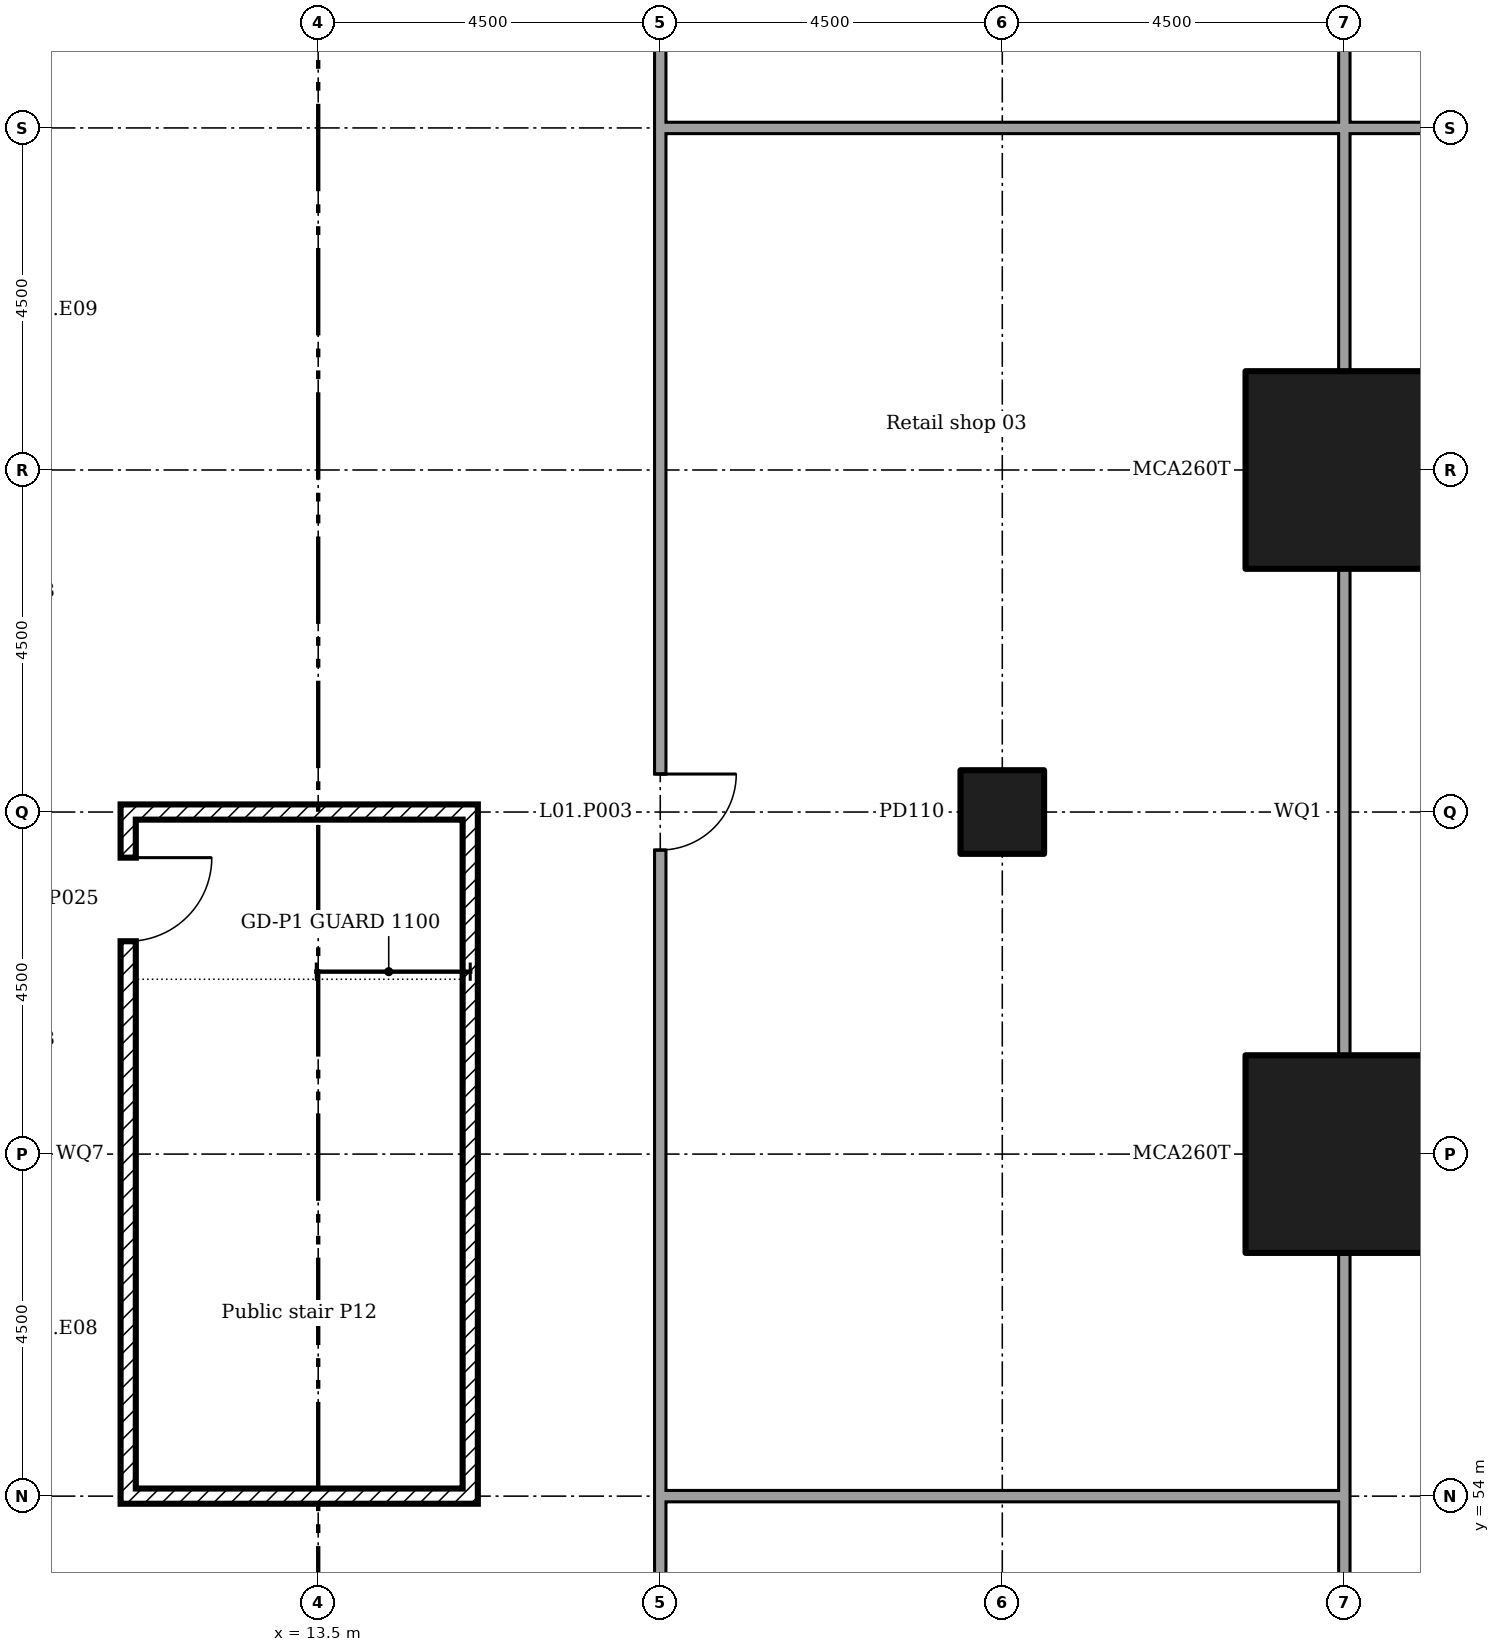
"""IFC4 building model, lengths in metres.
Left out: names, types, materials, properties, quantities, classifications, styles, units other than length and angle.
Written with IfcOpenShell. Run it as: python <this file> out.ifc"""

import sys

from ifc_helpers import new_model, si_unit, direction, frame, frame_2d, origin, origin_2d, place, context, subcontext, project, spatial, rectangle, extrude, element, fill, save


model = new_model("IFC4")
c1 = context("Model", 3, precision=1e-05, world=origin(), true_north=direction((0.0, 1.0)))
c2 = subcontext(c1, "Body", "Model", "MODEL_VIEW")
j1 = project(units=[si_unit("LENGTHUNIT", "METRE"), si_unit("PLANEANGLEUNIT", "RADIAN")], contexts=[c1])
p1 = place(None, origin())
s1 = spatial("IfcSite", under=j1, at=p1, CompositionType="ELEMENT")
p2 = place(p1, origin())
s2 = spatial("IfcBuilding", under=s1, at=p2, CompositionType="ELEMENT")
p3 = place(p2, frame((0.0, 0.0, 6.0)))
s3 = spatial("IfcBuildingStorey", under=s2, at=p3, CompositionType="ELEMENT", Elevation=6.0)
for number, where in (
    (1, (27.0, 58.5, 0.0)),
    (2, (27.0, 67.5, 0.0)),
):
    element("IfcColumn", number, at=place(p3, frame(where)), inside=s3, PredefinedType="COLUMN", context=c2, shape_type="SweptSolid", body=[
        extrude(rectangle(XDim=2.6, YDim=2.6, at=origin_2d()), origin(), (0.0, 0.0, 1.0), 5.5),
    ])
p4 = place(p3, frame((22.5, 63.0, 0.0)))
e3 = element("IfcColumn", 3, at=p4, inside=s3, PredefinedType="COLUMN", context=c2, shape_type="SweptSolid", body=[
    extrude(rectangle(XDim=1.1, YDim=1.1, at=origin_2d()), origin(), (0.0, 0.0, 1.0), 5.5),
])
p5 = place(p3, frame((18.0, 36.0, 0.0), z_axis=(0.0, 0.0, 1.0), x_axis=(0.0, 1.0, 0.0)))
e4 = element("IfcWall", 4, at=p5, inside=s3, PredefinedType="PARTITIONING", context=c2, shape_type="SweptSolid", body=[
    extrude(rectangle(XDim=18.075, YDim=0.15, at=frame_2d((9.038, 0.0))), origin(), (0.0, 0.0, 1.0), 5.05),
])
p6 = place(p5, frame((8.5, 0.0, 0.0)))
e5 = element("IfcOpeningElement", 5, at=p6, cuts=e4, PredefinedType="OPENING", context=c2, shape_type="SweptSolid", body=[
    extrude(rectangle(XDim=1.0, YDim=2.1, at=frame_2d((0.5, 1.05))), frame((0.0, 0.085, 0.0), z_axis=(0.0, -1.0, 0.0), x_axis=(1.0, 0.0, 0.0)), (0.0, 0.0, 1.0), 0.17),
])
p7 = place(p3, frame((18.0, 54.0, 0.0), z_axis=(0.0, 0.0, 1.0), x_axis=(0.0, 1.0, 0.0)))
e6 = element("IfcWall", 6, at=p7, inside=s3, PredefinedType="PARTITIONING", context=c2, shape_type="SweptSolid", body=[
    extrude(rectangle(XDim=18.075, YDim=0.15, at=frame_2d((9.038, 0.0))), origin(), (0.0, 0.0, 1.0), 5.05),
])
p8 = place(p7, frame((8.5, 0.0, 0.0)))
e7 = element("IfcOpeningElement", 7, at=p8, cuts=e6, PredefinedType="OPENING", context=c2, shape_type="SweptSolid", body=[
    extrude(rectangle(XDim=1.0, YDim=2.1, at=frame_2d((0.5, 1.05))), frame((0.0, 0.085, 0.0), z_axis=(0.0, -1.0, 0.0), x_axis=(1.0, 0.0, 0.0)), (0.0, 0.0, 1.0), 0.17),
])
p9 = place(p3, frame((18.0, 72.0, 0.0), z_axis=(0.0, 0.0, 1.0), x_axis=(0.0, 1.0, 0.0)))
e8 = element("IfcWall", 8, at=p9, inside=s3, PredefinedType="PARTITIONING", context=c2, shape_type="SweptSolid", body=[
    extrude(rectangle(XDim=9.0, YDim=0.15, at=frame_2d((4.5, 0.0))), origin(), (0.0, 0.0, 1.0), 5.05),
])
p10 = place(p9, frame((4.0, 0.0, 0.0)))
e9 = element("IfcOpeningElement", 9, at=p10, cuts=e8, PredefinedType="OPENING", context=c2, shape_type="SweptSolid", body=[
    extrude(rectangle(XDim=1.0, YDim=2.1, at=frame_2d((0.5, 1.05))), frame((0.0, 0.085, 0.0), z_axis=(0.0, -1.0, 0.0), x_axis=(1.0, 0.0, 0.0)), (0.0, 0.0, 1.0), 0.17),
])
p11 = place(p3, frame((11.0, 53.9, 0.0), z_axis=(0.0, 0.0, 1.0), x_axis=(0.0, 1.0, 0.0)))
e10 = element("IfcWall", 10, at=p11, inside=s3, PredefinedType="SOLIDWALL", context=c2, shape_type="SweptSolid", body=[
    extrude(rectangle(XDim=9.2, YDim=0.2, at=frame_2d((4.6, 0.0))), origin(), (0.0, 0.0, 1.0), 5.05),
])
p12 = place(p11, frame((7.4, 0.0, 0.0)))
e11 = element("IfcOpeningElement", 11, at=p12, cuts=e10, PredefinedType="OPENING", context=c2, shape_type="SweptSolid", body=[
    extrude(rectangle(XDim=1.1, YDim=2.1, at=frame_2d((0.55, 1.05))), frame((0.0, 0.11, 0.0), z_axis=(0.0, -1.0, 0.0), x_axis=(1.0, 0.0, 0.0)), (0.0, 0.0, 1.0), 0.22),
])
p13 = place(p3, frame((15.5, 53.9, 0.0), z_axis=(0.0, 0.0, 1.0), x_axis=(0.0, 1.0, 0.0)))
e12 = element("IfcWall", 12, at=p13, inside=s3, PredefinedType="SOLIDWALL", context=c2, shape_type="SweptSolid", body=[
    extrude(rectangle(XDim=9.2, YDim=0.2, at=frame_2d((4.6, 0.0))), origin(), (0.0, 0.0, 1.0), 5.05),
])
for number, where in (
    (13, (11.1, 54.0, 0.0)),
    (14, (11.1, 63.0, 0.0)),
):
    element("IfcWall", number, at=place(p3, frame(where)), inside=s3, PredefinedType="SOLIDWALL", context=c2, shape_type="SweptSolid", body=[
        extrude(rectangle(XDim=4.3, YDim=0.2, at=frame_2d((2.15, 0.0))), origin(), (0.0, 0.0, 1.0), 5.05),
    ])
p14 = place(p3, frame((18.075, 54.0, 0.0)))
e15 = element("IfcWall", 15, at=p14, inside=s3, PredefinedType="PARTITIONING", context=c2, shape_type="SweptSolid", body=[
    extrude(rectangle(XDim=9.0, YDim=0.15, at=frame_2d((4.5, 0.0))), origin(), (0.0, 0.0, 1.0), 5.05),
])
p15 = place(p3, frame((27.0, 46.295, 0.0), z_axis=(0.0, 0.0, 1.0), x_axis=(0.0, 1.0, 0.0)))
e16 = element("IfcWall", 16, at=p15, inside=s3, PredefinedType="PARTITIONING", context=c2, shape_type="SweptSolid", body=[
    extrude(rectangle(XDim=7.63, YDim=0.15, at=frame_2d((3.815, 0.0))), origin(), (0.0, 0.0, 1.0), 5.05),
])
p16 = place(p3, frame((18.075, 72.0, 0.0)))
e17 = element("IfcWall", 17, at=p16, inside=s3, PredefinedType="PARTITIONING", context=c2, shape_type="SweptSolid", body=[
    extrude(rectangle(XDim=9.0, YDim=0.15, at=frame_2d((4.5, 0.0))), origin(), (0.0, 0.0, 1.0), 5.05),
])
p17 = place(p3, frame((27.0, 54.0, 0.0), z_axis=(0.0, 0.0, 1.0), x_axis=(0.0, 1.0, 0.0)))
e18 = element("IfcWall", 18, at=p17, inside=s3, PredefinedType="PARTITIONING", context=c2, shape_type="SweptSolid", body=[
    extrude(rectangle(XDim=3.205, YDim=0.15, at=frame_2d((1.603, 0.0))), origin(), (0.0, 0.0, 1.0), 5.05),
])
p18 = place(p3, frame((27.0, 59.795, 0.0), z_axis=(0.0, 0.0, 1.0), x_axis=(0.0, 1.0, 0.0)))
e19 = element("IfcWall", 19, at=p18, inside=s3, PredefinedType="PARTITIONING", context=c2, shape_type="SweptSolid", body=[
    extrude(rectangle(XDim=6.41, YDim=0.15, at=frame_2d((3.205, 0.0))), origin(), (0.0, 0.0, 1.0), 5.05),
])
p19 = place(p3, frame((27.0, 68.795, 0.0), z_axis=(0.0, 0.0, 1.0), x_axis=(0.0, 1.0, 0.0)))
e20 = element("IfcWall", 20, at=p19, inside=s3, PredefinedType="PARTITIONING", context=c2, shape_type="SweptSolid", body=[
    extrude(rectangle(XDim=3.13, YDim=0.15, at=frame_2d((1.565, 0.0))), origin(), (0.0, 0.0, 1.0), 5.05),
])
p20 = place(p3, frame((27.0, 71.925, 0.0), z_axis=(0.0, 0.0, 1.0), x_axis=(0.0, 1.0, 0.0)))
e21 = element("IfcWall", 21, at=p20, inside=s3, PredefinedType="PARTITIONING", context=c2, shape_type="SweptSolid", body=[
    extrude(rectangle(XDim=9.0, YDim=0.15, at=frame_2d((4.5, 0.0))), origin(), (0.0, 0.0, 1.0), 5.05),
])
p21 = place(p3, frame((27.075, 72.0, 0.0)))
e22 = element("IfcWall", 22, at=p21, inside=s3, PredefinedType="PARTITIONING", context=c2, shape_type="SweptSolid", body=[
    extrude(rectangle(XDim=3.13, YDim=0.15, at=frame_2d((1.565, 0.0))), origin(), (0.0, 0.0, 1.0), 5.05),
])
p22 = place(p8, frame((1.0, 0.0, 0.0), x_axis=(-1.0, 0.0, 0.0)))
e23 = element("IfcDoor", 23, at=p22, inside=s3, OperationType="SINGLE_SWING_RIGHT", PredefinedType="DOOR", context=c2, shape_type="SweptSolid", body=[
    extrude(rectangle(XDim=1.0, YDim=2.1, at=frame_2d((0.5, 1.05))), frame((0.0, 0.025, 0.0), z_axis=(0.0, -1.0, 0.0), x_axis=(1.0, 0.0, 0.0)), (0.0, 0.0, 1.0), 0.05),
])
fill(e7, e23)
p23 = place(p12, frame((1.1, 0.0, 0.0), x_axis=(-1.0, 0.0, 0.0)))
e24 = element("IfcDoor", 24, at=p23, inside=s3, OperationType="SINGLE_SWING_RIGHT", PredefinedType="DOOR", context=c2, shape_type="SweptSolid", body=[
    extrude(rectangle(XDim=1.1, YDim=2.1, at=frame_2d((0.55, 1.05))), frame((0.0, 0.025, 0.0), z_axis=(0.0, -1.0, 0.0), x_axis=(1.0, 0.0, 0.0)), (0.0, 0.0, 1.0), 0.05),
])
fill(e11, e24)
save(model, sys.argv[1])
